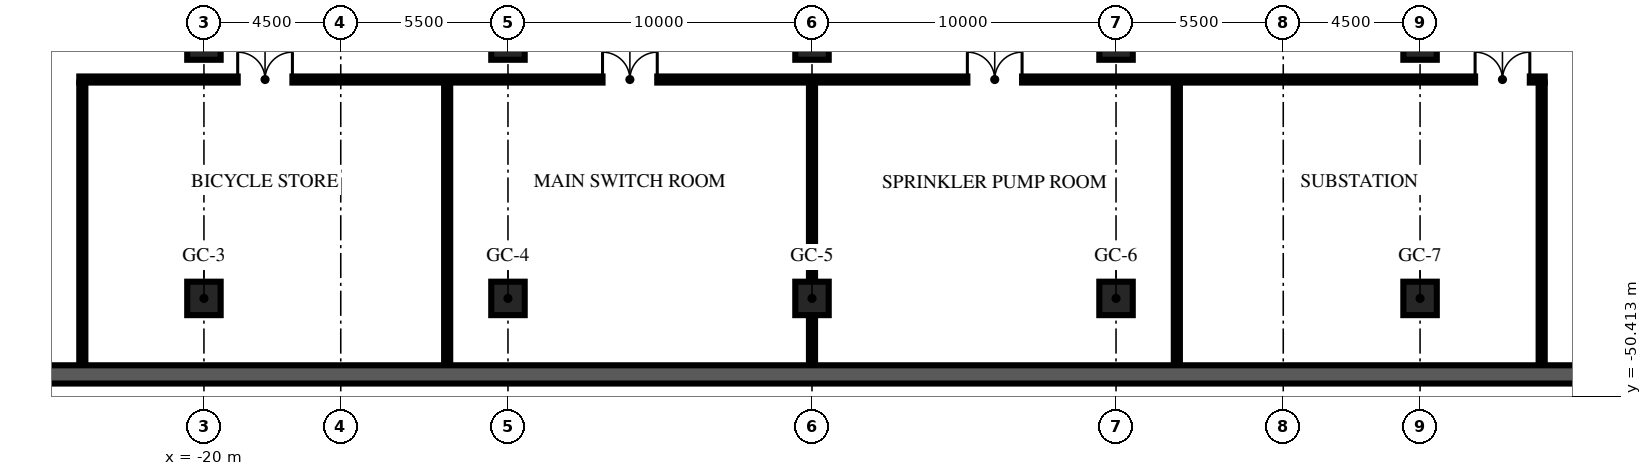
"""IFC4 building model, lengths in metres.
Left out: names, types, materials, properties, quantities, classifications, styles, units other than length and angle.
Written with IfcOpenShell. Run it as: python <this file> out.ifc"""

import sys

from ifc_helpers import new_model, si_unit, direction, frame, frame_2d, origin, origin_2d, place, context, subcontext, project, spatial, rectangle, extrude, element, fill, save


model = new_model("IFC4")
c1 = context("Model", 3, precision=1e-05, world=origin(), true_north=direction((0.0, 1.0)))
c2 = subcontext(c1, "Body", "Model", "MODEL_VIEW")
j1 = project(units=[si_unit("LENGTHUNIT", "METRE"), si_unit("PLANEANGLEUNIT", "RADIAN")], contexts=[c1])
p1 = place(None, origin())
s1 = spatial("IfcSite", under=j1, at=p1, CompositionType="ELEMENT")
p2 = place(p1, origin())
s2 = spatial("IfcBuilding", under=s1, at=p2, CompositionType="ELEMENT")
p3 = place(p2, frame((0.0, 0.0, -5.4)))
s3 = spatial("IfcBuildingStorey", under=s2, at=p3, CompositionType="ELEMENT", Elevation=-5.4)
p4 = place(p3, frame((-46.0, -49.7, -0.3), z_axis=(0.0, 0.0, 1.0), x_axis=(1.0, 0.0, 0.0)))
e1 = element("IfcWall", 1, at=p4, inside=s3, PredefinedType="SOLIDWALL", context=c2, shape_type="SweptSolid", body=[
    extrude(rectangle(XDim=92.0, YDim=0.6, at=frame_2d((46.0, 0.0))), origin(), (0.0, 0.0, 1.0), 5.1),
])
for number, where, z_axis, x_axis in (
    (2, (-20.0, -47.2, 0.0), (0.0, 0.0, 1.0), (1.0, 0.0, 0.0)),
    (3, (-10.0, -47.2, 0.0), (0.0, 0.0, 1.0), (1.0, 0.0, 0.0)),
    (4, (0.0, -47.2, 0.0), (0.0, 0.0, 1.0), (1.0, 0.0, 0.0)),
    (5, (10.0, -47.2, 0.0), (0.0, 0.0, 1.0), (1.0, 0.0, 0.0)),
    (6, (20.0, -47.2, 0.0), (0.0, 0.0, 1.0), (1.0, 0.0, 0.0)),
    (7, (-20.0, -38.8, 0.0), (0.0, 0.0, 1.0), (1.0, 0.0, 0.0)),
    (8, (-10.0, -38.8, 0.0), (0.0, 0.0, 1.0), (1.0, 0.0, 0.0)),
    (9, (0.0, -38.8, 0.0), (0.0, 0.0, 1.0), (1.0, 0.0, 0.0)),
    (10, (10.0, -38.8, 0.0), (0.0, 0.0, 1.0), (1.0, 0.0, 0.0)),
    (11, (20.0, -38.8, 0.0), (0.0, 0.0, 1.0), (1.0, 0.0, 0.0)),
):
    element("IfcColumn", number, at=place(p3, frame(where, z_axis=z_axis, x_axis=x_axis)), inside=s3, PredefinedType="COLUMN", context=c2, shape_type="SweptSolid", body=[
        extrude(rectangle(XDim=1.1, YDim=1.1, at=origin_2d()), origin(), (0.0, 0.0, 1.0), 5.2),
    ])
for number, where, z_axis, x_axis in (
    (12, (-24.0, -49.38, 0.0), (0.0, 0.0, 1.0), (0.0, 1.0, 0.0)),
    (13, (-12.0, -49.38, 0.0), (0.0, 0.0, 1.0), (0.0, 1.0, 0.0)),
):
    element("IfcWall", number, at=place(p3, frame(where, z_axis=z_axis, x_axis=x_axis)), inside=s3, PredefinedType="SOLIDWALL", context=c2, shape_type="SweptSolid", body=[
        extrude(rectangle(XDim=9.28, YDim=0.2, at=frame_2d((4.64, 0.0))), origin(), (0.0, 0.0, 1.0), 3.4),
    ])
p5 = place(p3, frame((0.0, -49.38, 0.0), z_axis=(0.0, 0.0, 1.0), x_axis=(0.0, 1.0, 0.0)))
e14 = element("IfcWall", 14, at=p5, inside=s3, PredefinedType="SOLIDWALL", context=c2, shape_type="SweptSolid", body=[
    extrude(rectangle(XDim=1.6, YDim=0.2, at=frame_2d((0.8, 0.0))), origin(), (0.0, 0.0, 1.0), 3.4),
])
for number, where, z_axis, x_axis in (
    (15, (12.0, -49.38, 0.0), (0.0, 0.0, 1.0), (0.0, 1.0, 0.0)),
    (16, (24.0, -49.38, 0.0), (0.0, 0.0, 1.0), (0.0, 1.0, 0.0)),
):
    element("IfcWall", number, at=place(p3, frame(where, z_axis=z_axis, x_axis=x_axis)), inside=s3, PredefinedType="SOLIDWALL", context=c2, shape_type="SweptSolid", body=[
        extrude(rectangle(XDim=9.28, YDim=0.2, at=frame_2d((4.64, 0.0))), origin(), (0.0, 0.0, 1.0), 3.4),
    ])
p6 = place(p3, frame((0.0, -46.62, 0.0), z_axis=(0.0, 0.0, 1.0), x_axis=(0.0, 1.0, 0.0)))
e17 = element("IfcWall", 17, at=p6, inside=s3, PredefinedType="SOLIDWALL", context=c2, shape_type="SweptSolid", body=[
    extrude(rectangle(XDim=6.52, YDim=0.2, at=frame_2d((3.26, 0.0))), origin(), (0.0, 0.0, 1.0), 3.4),
])
p7 = place(p3, frame((-24.1, -40.0, 0.0), z_axis=(0.0, 0.0, 1.0), x_axis=(1.0, 0.0, 0.0)))
e18 = element("IfcWall", 18, at=p7, inside=s3, PredefinedType="SOLIDWALL", context=c2, shape_type="SweptSolid", body=[
    extrude(rectangle(XDim=48.2, YDim=0.2, at=frame_2d((24.1, 0.0))), origin(), (0.0, 0.0, 1.0), 3.4),
])
p8 = place(p7, frame((5.21, 0.0, 0.0)))
e19 = element("IfcOpeningElement", 19, at=p8, cuts=e18, PredefinedType="OPENING", context=c2, shape_type="SweptSolid", body=[
    extrude(rectangle(XDim=1.8, YDim=2.4, at=frame_2d((0.9, 1.2))), frame((0.0, 0.11, 0.0), z_axis=(0.0, -1.0, 0.0), x_axis=(1.0, 0.0, 0.0)), (0.0, 0.0, 1.0), 0.22),
])
p9 = place(p7, frame((17.21, 0.0, 0.0)))
e20 = element("IfcOpeningElement", 20, at=p9, cuts=e18, PredefinedType="OPENING", context=c2, shape_type="SweptSolid", body=[
    extrude(rectangle(XDim=1.8, YDim=2.4, at=frame_2d((0.9, 1.2))), frame((0.0, 0.11, 0.0), z_axis=(0.0, -1.0, 0.0), x_axis=(1.0, 0.0, 0.0)), (0.0, 0.0, 1.0), 0.22),
])
p10 = place(p7, frame((29.21, 0.0, 0.0)))
e21 = element("IfcOpeningElement", 21, at=p10, cuts=e18, PredefinedType="OPENING", context=c2, shape_type="SweptSolid", body=[
    extrude(rectangle(XDim=1.8, YDim=2.4, at=frame_2d((0.9, 1.2))), frame((0.0, 0.11, 0.0), z_axis=(0.0, -1.0, 0.0), x_axis=(1.0, 0.0, 0.0)), (0.0, 0.0, 1.0), 0.22),
])
p11 = place(p7, frame((45.91, 0.0, 0.0)))
e22 = element("IfcOpeningElement", 22, at=p11, cuts=e18, PredefinedType="OPENING", context=c2, shape_type="SweptSolid", body=[
    extrude(rectangle(XDim=1.8, YDim=2.4, at=frame_2d((0.9, 1.2))), frame((0.0, 0.11, 0.0), z_axis=(0.0, -1.0, 0.0), x_axis=(1.0, 0.0, 0.0)), (0.0, 0.0, 1.0), 0.22),
])
p12 = place(p8, origin())
e23 = element("IfcDoor", 23, at=p12, inside=s3, OperationType="DOUBLE_DOOR_SINGLE_SWING", PredefinedType="DOOR", context=c2, shape_type="SweptSolid", body=[
    extrude(rectangle(XDim=1.8, YDim=2.4, at=frame_2d((0.9, 1.2))), frame((0.0, 0.025, 0.0), z_axis=(0.0, -1.0, 0.0), x_axis=(1.0, 0.0, 0.0)), (0.0, 0.0, 1.0), 0.05),
])
fill(e19, e23)
p13 = place(p9, origin())
e24 = element("IfcDoor", 24, at=p13, inside=s3, OperationType="DOUBLE_DOOR_SINGLE_SWING", PredefinedType="DOOR", context=c2, shape_type="SweptSolid", body=[
    extrude(rectangle(XDim=1.8, YDim=2.4, at=frame_2d((0.9, 1.2))), frame((0.0, 0.025, 0.0), z_axis=(0.0, -1.0, 0.0), x_axis=(1.0, 0.0, 0.0)), (0.0, 0.0, 1.0), 0.05),
])
fill(e20, e24)
p14 = place(p10, origin())
e25 = element("IfcDoor", 25, at=p14, inside=s3, OperationType="DOUBLE_DOOR_SINGLE_SWING", PredefinedType="DOOR", context=c2, shape_type="SweptSolid", body=[
    extrude(rectangle(XDim=1.8, YDim=2.4, at=frame_2d((0.9, 1.2))), frame((0.0, 0.025, 0.0), z_axis=(0.0, -1.0, 0.0), x_axis=(1.0, 0.0, 0.0)), (0.0, 0.0, 1.0), 0.05),
])
fill(e21, e25)
p15 = place(p11, origin())
e26 = element("IfcDoor", 26, at=p15, inside=s3, OperationType="DOUBLE_DOOR_SINGLE_SWING", PredefinedType="DOOR", context=c2, shape_type="SweptSolid", body=[
    extrude(rectangle(XDim=1.8, YDim=2.4, at=frame_2d((0.9, 1.2))), frame((0.0, 0.025, 0.0), z_axis=(0.0, -1.0, 0.0), x_axis=(1.0, 0.0, 0.0)), (0.0, 0.0, 1.0), 0.05),
])
fill(e22, e26)
save(model, sys.argv[1])
